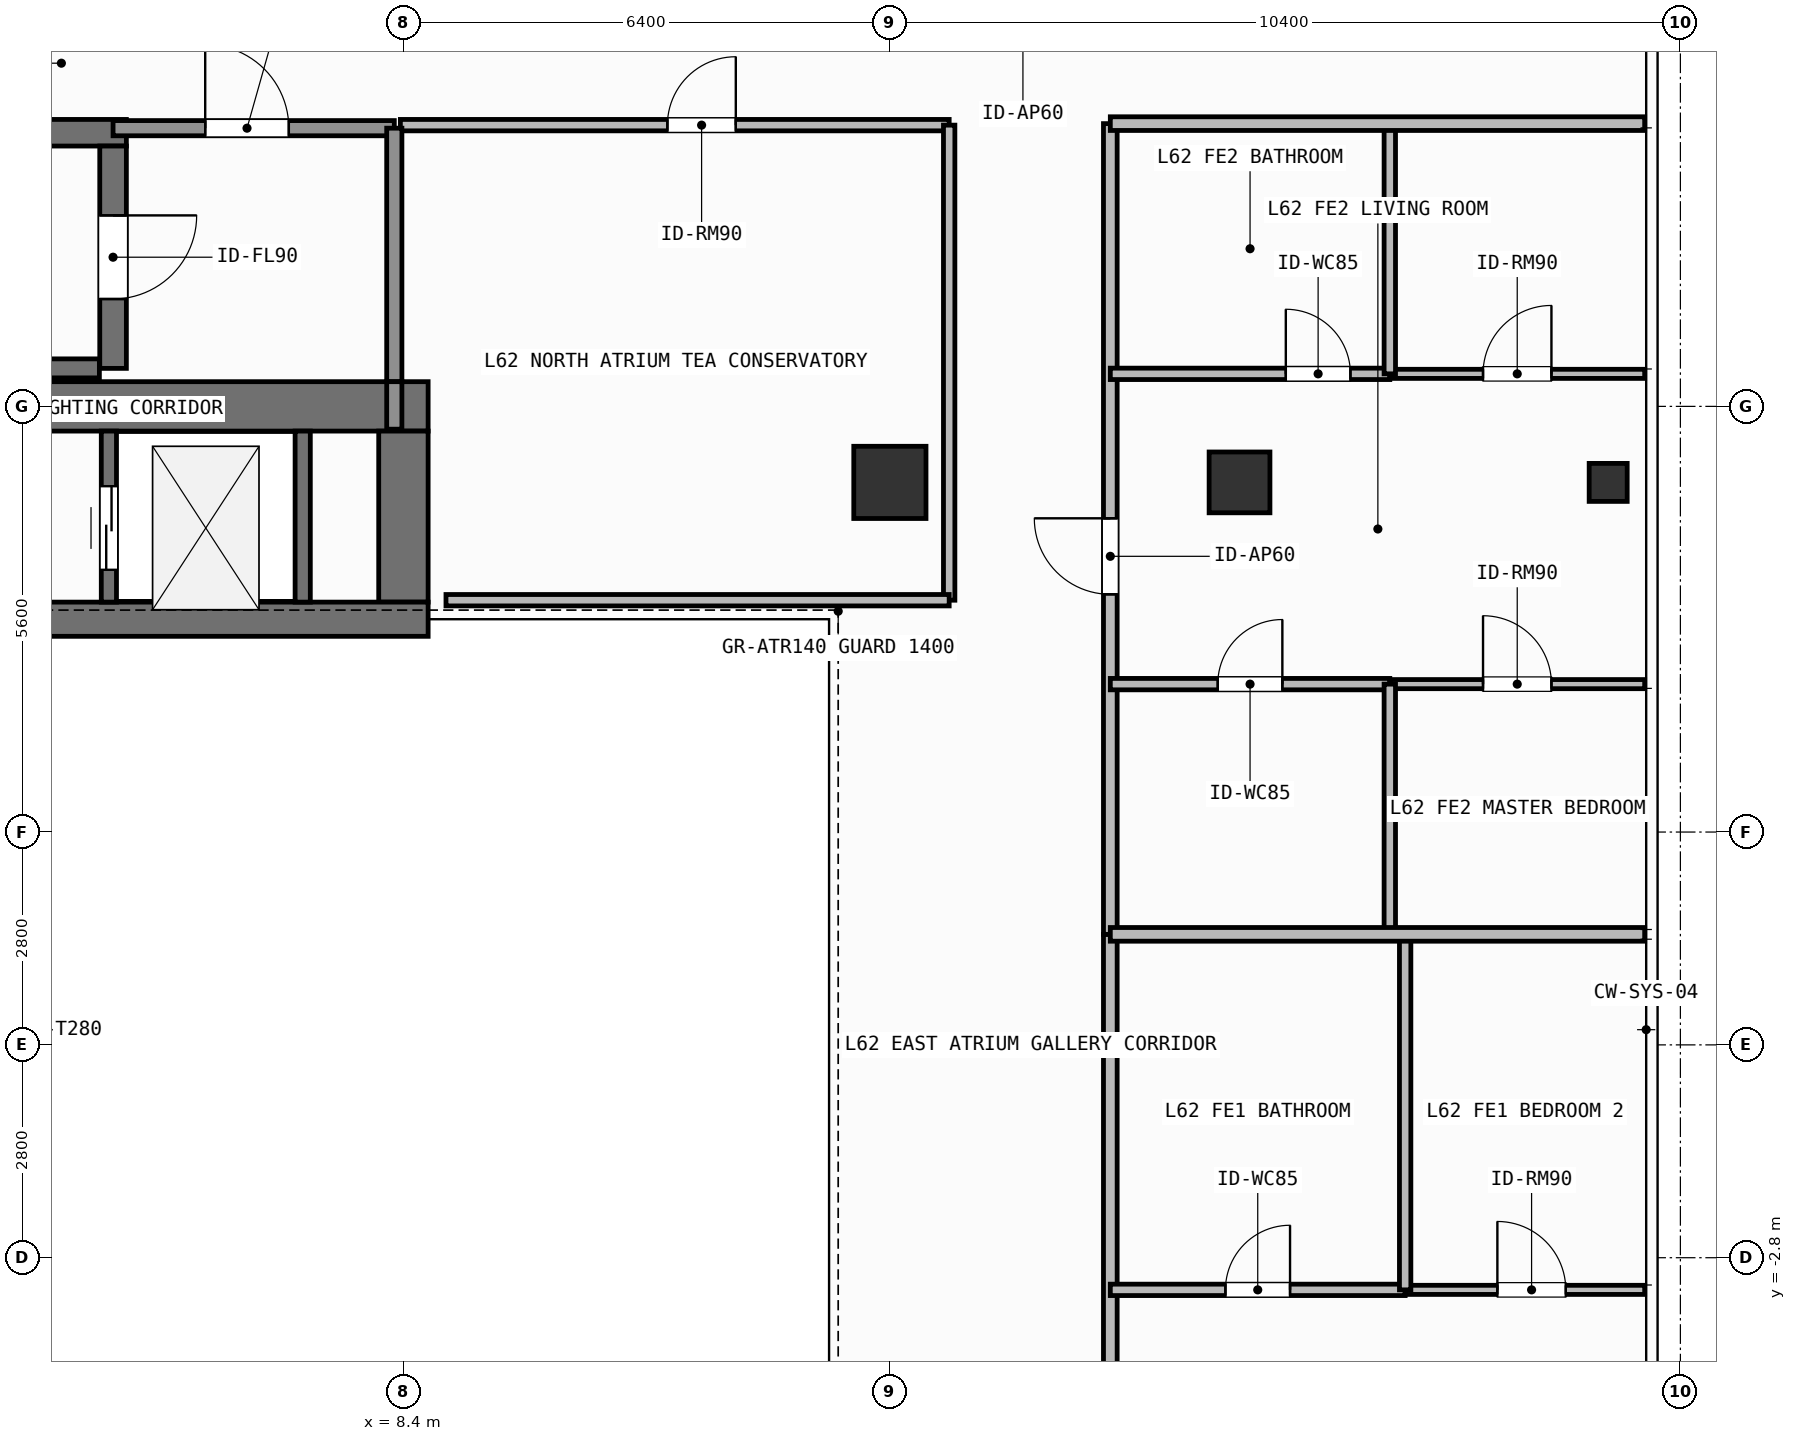
"""IFC4 building model, lengths in metres.
Left out: names, types, materials, properties, quantities, classifications, styles, units other than length and angle.
Written with IfcOpenShell. Run it as: python <this file> out.ifc"""

import sys

from ifc_helpers import new_model, si_unit, direction, frame, frame_2d, origin, origin_2d, place, context, subcontext, project, spatial, rectangle, hollow_rectangle, extrude, element, fill, save


model = new_model("IFC4")
c1 = context("Model", 3, precision=1e-05, world=origin(), true_north=direction((0.0, 1.0)))
c2 = subcontext(c1, "Body", "Model", "MODEL_VIEW")
j1 = project(units=[si_unit("LENGTHUNIT", "METRE"), si_unit("PLANEANGLEUNIT", "RADIAN")], contexts=[c1])
p1 = place(None, origin())
s1 = spatial("IfcSite", under=j1, at=p1, CompositionType="ELEMENT")
p2 = place(p1, origin())
s2 = spatial("IfcBuilding", under=s1, at=p2, CompositionType="ELEMENT")
p3 = place(p2, frame((0.0, 0.0, 254.7)))
s3 = spatial("IfcBuildingStorey", under=s2, at=p3, CompositionType="ELEMENT", Elevation=254.7)
p4 = place(p3, frame((-7.55, 8.4, 0.0), z_axis=(0.0, 0.0, 1.0), x_axis=(1.0, 0.0, 0.0)))
e1 = element("IfcWall", 1, at=p4, inside=s3, PredefinedType="SHEAR", context=c2, shape_type="SweptSolid", body=[
    extrude(rectangle(XDim=16.275, YDim=0.65, at=frame_2d((8.138, 0.0))), origin(), (0.0, 0.0, 1.0), 3.9),
])
p5 = place(p3, frame((8.4, 5.825, 0.0), z_axis=(0.0, 0.0, 1.0), x_axis=(0.0, 1.0, 0.0)))
e2 = element("IfcWall", 2, at=p5, inside=s3, PredefinedType="SHEAR", context=c2, shape_type="SweptSolid", body=[
    extrude(rectangle(XDim=2.25, YDim=0.65, at=frame_2d((1.125, 0.0))), origin(), (0.0, 0.0, 1.0), 3.9),
])
p6 = place(p3, frame((3.045, 5.6, 0.0), z_axis=(0.0, 0.0, 1.0), x_axis=(1.0, 0.0, 0.0)))
e3 = element("IfcWall", 3, at=p6, inside=s3, PredefinedType="SHEAR", context=c2, shape_type="SweptSolid", body=[
    extrude(rectangle(XDim=5.68, YDim=0.45, at=frame_2d((2.84, 0.0))), origin(), (0.0, 0.0, 1.0), 3.9),
])
p7 = place(p3, frame((-2.555, 12.0, 0.0), z_axis=(0.0, 0.0, 1.0), x_axis=(1.0, 0.0, 0.0)))
e4 = element("IfcWall", 4, at=p7, inside=s3, PredefinedType="SHEAR", context=c2, shape_type="SweptSolid", body=[
    extrude(rectangle(XDim=7.31, YDim=0.35, at=frame_2d((3.655, 0.0))), origin(), (0.0, 0.0, 1.0), 3.9),
])
p8 = place(p3, frame((-2.2, 8.9, 0.0), z_axis=(0.0, 0.0, 1.0), x_axis=(1.0, 0.0, 0.0)))
e5 = element("IfcWall", 5, at=p8, inside=s3, PredefinedType="SHEAR", context=c2, shape_type="SweptSolid", body=[
    extrude(rectangle(XDim=6.6, YDim=0.25, at=frame_2d((3.3, 0.0))), origin(), (0.0, 0.0, 1.0), 3.9),
])
p9 = place(p3, frame((4.58, 11.825, 0.0), z_axis=(0.0, 0.0, 1.0), x_axis=(0.0, -1.0, 0.0)))
e6 = element("IfcWall", 6, at=p9, inside=s3, PredefinedType="SHEAR", context=c2, shape_type="SweptSolid", body=[
    extrude(rectangle(XDim=2.925, YDim=0.35, at=frame_2d((1.462, 0.0))), origin(), (0.0, 0.0, 1.0), 3.9),
])
p10 = place(p9, frame((0.913, 0.0, 0.0)))
e7 = element("IfcOpeningElement", 7, at=p10, cuts=e6, PredefinedType="OPENING", context=c2, shape_type="SweptSolid", body=[
    extrude(rectangle(XDim=1.1, YDim=2.15, at=frame_2d((0.55, 1.075))), frame((0.0, 0.185, 0.0), z_axis=(0.0, -1.0, 0.0), x_axis=(1.0, 0.0, 0.0)), (0.0, 0.0, 1.0), 0.37),
])
p11 = place(p3, frame((14.8, 7.4, 0.0), z_axis=(0.0, 0.0, 1.0), x_axis=(1.0, 0.0, 0.0)))
e8 = element("IfcColumn", 8, at=p11, inside=s3, PredefinedType="COLUMN", context=c2, shape_type="SweptSolid", body=[
    extrude(rectangle(XDim=0.95, YDim=0.95, at=origin_2d()), origin(), (0.0, 0.0, 1.0), 3.9),
])
p12 = place(p3, frame((19.4, 7.4, 0.0), z_axis=(0.0, 0.0, 1.0), x_axis=(1.0, 0.0, 0.0)))
e9 = element("IfcColumn", 9, at=p12, inside=s3, PredefinedType="COLUMN", context=c2, shape_type="SweptSolid", body=[
    extrude(hollow_rectangle(XDim=0.8, YDim=0.8, WallThickness=0.036, at=origin_2d()), origin(), (0.0, 0.0, 1.0), 3.9),
])
p13 = place(p3, frame((24.25, 7.4, 0.0), z_axis=(0.0, 0.0, 1.0), x_axis=(1.0, 0.0, 0.0)))
e10 = element("IfcColumn", 10, at=p13, inside=s3, PredefinedType="COLUMN", context=c2, shape_type="SweptSolid", body=[
    extrude(hollow_rectangle(XDim=0.5, YDim=0.5, WallThickness=0.025, at=origin_2d()), origin(), (0.0, 0.0, 1.0), 3.9),
])
p14 = place(p3, frame((4.525, 5.825, 0.0), z_axis=(0.0, 0.0, 1.0), x_axis=(0.0, 1.0, 0.0)))
e11 = element("IfcWall", 11, at=p14, inside=s3, PredefinedType="SHEAR", context=c2, shape_type="SweptSolid", body=[
    extrude(rectangle(XDim=2.25, YDim=0.2, at=frame_2d((1.125, 0.0))), origin(), (0.0, 0.0, 1.0), 3.68),
])
p15 = place(p14, frame((0.425, 0.0, 0.0)))
e12 = element("IfcOpeningElement", 12, at=p15, cuts=e11, PredefinedType="OPENING", context=c2, shape_type="SweptSolid", body=[
    extrude(rectangle(XDim=1.1, YDim=2.2, at=frame_2d((0.55, 1.1))), frame((0.0, 0.11, 0.0), z_axis=(0.0, -1.0, 0.0), x_axis=(1.0, 0.0, 0.0)), (0.0, 0.0, 1.0), 0.22),
])
p16 = place(p3, frame((7.075, 5.825, 0.0), z_axis=(0.0, 0.0, 1.0), x_axis=(0.0, 1.0, 0.0)))
e13 = element("IfcWall", 13, at=p16, inside=s3, PredefinedType="SHEAR", context=c2, shape_type="SweptSolid", body=[
    extrude(rectangle(XDim=2.25, YDim=0.2, at=frame_2d((1.125, 0.0))), origin(), (0.0, 0.0, 1.0), 3.68),
])
p17 = place(p3, frame((4.58, 12.06, 0.0), z_axis=(0.0, 0.0, 1.0), x_axis=(1.0, 0.0, 0.0)))
e14 = element("IfcWall", 14, at=p17, inside=s3, PredefinedType="SOLIDWALL", context=c2, shape_type="SweptSolid", body=[
    extrude(rectangle(XDim=3.7, YDim=0.2, at=frame_2d((1.85, 0.0))), origin(), (0.0, 0.0, 1.0), 3.68),
])
p18 = place(p17, frame((1.212, 0.0, 0.0)))
e15 = element("IfcOpeningElement", 15, at=p18, cuts=e14, PredefinedType="OPENING", context=c2, shape_type="SweptSolid", body=[
    extrude(rectangle(XDim=1.1, YDim=2.15, at=frame_2d((0.55, 1.075))), frame((0.0, 0.11, 0.0), z_axis=(0.0, -1.0, 0.0), x_axis=(1.0, 0.0, 0.0)), (0.0, 0.0, 1.0), 0.22),
])
p19 = place(p3, frame((8.36, 12.1, 0.0), z_axis=(0.0, 0.0, 1.0), x_axis=(1.0, 0.0, 0.0)))
e16 = element("IfcWall", 16, at=p19, inside=s3, PredefinedType="PARTITIONING", context=c2, shape_type="SweptSolid", body=[
    extrude(rectangle(XDim=7.22, YDim=0.15, at=frame_2d((3.61, 0.0))), origin(), (0.0, 0.0, 1.0), 3.68),
])
p20 = place(p19, frame((3.513, 0.0, 0.0)))
e17 = element("IfcOpeningElement", 17, at=p20, cuts=e16, PredefinedType="OPENING", context=c2, shape_type="SweptSolid", body=[
    extrude(rectangle(XDim=0.9, YDim=2.1, at=frame_2d((0.45, 1.05))), frame((0.0, 0.085, 0.0), z_axis=(0.0, -1.0, 0.0), x_axis=(1.0, 0.0, 0.0)), (0.0, 0.0, 1.0), 0.17),
])
p21 = place(p3, frame((17.7, -12.12, 0.0), z_axis=(0.0, 0.0, 1.0), x_axis=(0.0, 1.0, 0.0)))
e18 = element("IfcWall", 18, at=p21, inside=s3, PredefinedType="PARTITIONING", context=c2, shape_type="SweptSolid", body=[
    extrude(rectangle(XDim=13.574, YDim=0.18, at=frame_2d((6.787, 0.0))), origin(), (0.0, 0.0, 1.0), 3.68),
])
p22 = place(p21, frame((5.665, 0.0, 0.0)))
e19 = element("IfcOpeningElement", 19, at=p22, cuts=e18, PredefinedType="OPENING", context=c2, shape_type="SweptSolid", body=[
    extrude(rectangle(XDim=1.0, YDim=2.2, at=frame_2d((0.5, 1.1))), frame((0.0, 0.1, 0.0), z_axis=(0.0, -1.0, 0.0), x_axis=(1.0, 0.0, 0.0)), (0.0, 0.0, 1.0), 0.2),
])
p23 = place(p3, frame((17.7, -3.223, 0.0), z_axis=(0.0, 0.0, 1.0), x_axis=(1.0, 0.0, 0.0)))
e20 = element("IfcWall", 20, at=p23, inside=s3, PredefinedType="PARTITIONING", context=c2, shape_type="SweptSolid", body=[
    extrude(rectangle(XDim=3.879, YDim=0.15, at=frame_2d((1.939, 0.0))), origin(), (0.0, 0.0, 1.0), 3.68),
])
p24 = place(p23, frame((1.514, 0.0, 0.0)))
e21 = element("IfcOpeningElement", 21, at=p24, cuts=e20, PredefinedType="OPENING", context=c2, shape_type="SweptSolid", body=[
    extrude(rectangle(XDim=0.85, YDim=2.1, at=frame_2d((0.425, 1.05))), frame((0.0, 0.085, 0.0), z_axis=(0.0, -1.0, 0.0), x_axis=(1.0, 0.0, 0.0)), (0.0, 0.0, 1.0), 0.17),
])
p25 = place(p3, frame((21.579, -3.223, 0.0), z_axis=(0.0, 0.0, 1.0), x_axis=(1.0, 0.0, 0.0)))
e22 = element("IfcWall", 22, at=p25, inside=s3, PredefinedType="PARTITIONING", context=c2, shape_type="SweptSolid", body=[
    extrude(rectangle(XDim=3.151, YDim=0.12, at=frame_2d((1.575, 0.0))), origin(), (0.0, 0.0, 1.0), 3.68),
])
p26 = place(p25, frame((1.213, 0.0, 0.0)))
e23 = element("IfcOpeningElement", 23, at=p26, cuts=e22, PredefinedType="OPENING", context=c2, shape_type="SweptSolid", body=[
    extrude(rectangle(XDim=0.9, YDim=2.1, at=frame_2d((0.45, 1.05))), frame((0.0, 0.07, 0.0), z_axis=(0.0, -1.0, 0.0), x_axis=(1.0, 0.0, 0.0)), (0.0, 0.0, 1.0), 0.14),
])
p27 = place(p3, frame((17.7, 1.454, 0.0), z_axis=(0.0, 0.0, 1.0), x_axis=(0.0, 1.0, 0.0)))
e24 = element("IfcWall", 24, at=p27, inside=s3, PredefinedType="PARTITIONING", context=c2, shape_type="SweptSolid", body=[
    extrude(rectangle(XDim=10.666, YDim=0.18, at=frame_2d((5.333, 0.0))), origin(), (0.0, 0.0, 1.0), 3.68),
])
p28 = place(p27, frame((4.473, 0.0, 0.0)))
e25 = element("IfcOpeningElement", 25, at=p28, cuts=e24, PredefinedType="OPENING", context=c2, shape_type="SweptSolid", body=[
    extrude(rectangle(XDim=1.0, YDim=2.2, at=frame_2d((0.5, 1.1))), frame((0.0, 0.1, 0.0), z_axis=(0.0, -1.0, 0.0), x_axis=(1.0, 0.0, 0.0)), (0.0, 0.0, 1.0), 0.2),
])
p29 = place(p3, frame((17.7, 8.828, 0.0), z_axis=(0.0, 0.0, 1.0), x_axis=(1.0, 0.0, 0.0)))
e26 = element("IfcWall", 26, at=p29, inside=s3, PredefinedType="PARTITIONING", context=c2, shape_type="SweptSolid", body=[
    extrude(rectangle(XDim=3.677, YDim=0.15, at=frame_2d((1.838, 0.0))), origin(), (0.0, 0.0, 1.0), 3.68),
])
p30 = place(p29, frame((2.309, 0.0, 0.0)))
e27 = element("IfcOpeningElement", 27, at=p30, cuts=e26, PredefinedType="OPENING", context=c2, shape_type="SweptSolid", body=[
    extrude(rectangle(XDim=0.85, YDim=2.1, at=frame_2d((0.425, 1.05))), frame((0.0, 0.085, 0.0), z_axis=(0.0, -1.0, 0.0), x_axis=(1.0, 0.0, 0.0)), (0.0, 0.0, 1.0), 0.17),
])
p31 = place(p3, frame((17.7, 4.746, 0.0), z_axis=(0.0, 0.0, 1.0), x_axis=(1.0, 0.0, 0.0)))
e28 = element("IfcWall", 28, at=p31, inside=s3, PredefinedType="PARTITIONING", context=c2, shape_type="SweptSolid", body=[
    extrude(rectangle(XDim=3.677, YDim=0.15, at=frame_2d((1.838, 0.0))), origin(), (0.0, 0.0, 1.0), 3.68),
])
p32 = place(p31, frame((1.414, 0.0, 0.0)))
e29 = element("IfcOpeningElement", 29, at=p32, cuts=e28, PredefinedType="OPENING", context=c2, shape_type="SweptSolid", body=[
    extrude(rectangle(XDim=0.85, YDim=2.1, at=frame_2d((0.425, 1.05))), frame((0.0, 0.085, 0.0), z_axis=(0.0, -1.0, 0.0), x_axis=(1.0, 0.0, 0.0)), (0.0, 0.0, 1.0), 0.17),
])
p33 = place(p3, frame((21.377, 4.746, 0.0), z_axis=(0.0, 0.0, 1.0), x_axis=(1.0, 0.0, 0.0)))
e30 = element("IfcWall", 30, at=p33, inside=s3, PredefinedType="PARTITIONING", context=c2, shape_type="SweptSolid", body=[
    extrude(rectangle(XDim=3.353, YDim=0.12, at=frame_2d((1.677, 0.0))), origin(), (0.0, 0.0, 1.0), 3.68),
])
p34 = place(p33, frame((1.227, 0.0, 0.0)))
e31 = element("IfcOpeningElement", 31, at=p34, cuts=e30, PredefinedType="OPENING", context=c2, shape_type="SweptSolid", body=[
    extrude(rectangle(XDim=0.9, YDim=2.1, at=frame_2d((0.45, 1.05))), frame((0.0, 0.07, 0.0), z_axis=(0.0, -1.0, 0.0), x_axis=(1.0, 0.0, 0.0)), (0.0, 0.0, 1.0), 0.14),
])
p35 = place(p3, frame((21.377, 8.828, 0.0), z_axis=(0.0, 0.0, 1.0), x_axis=(1.0, 0.0, 0.0)))
e32 = element("IfcWall", 32, at=p35, inside=s3, PredefinedType="PARTITIONING", context=c2, shape_type="SweptSolid", body=[
    extrude(rectangle(XDim=3.353, YDim=0.12, at=frame_2d((1.677, 0.0))), origin(), (0.0, 0.0, 1.0), 3.68),
])
p36 = place(p35, frame((1.227, 0.0, 0.0)))
e33 = element("IfcOpeningElement", 33, at=p36, cuts=e32, PredefinedType="OPENING", context=c2, shape_type="SweptSolid", body=[
    extrude(rectangle(XDim=0.9, YDim=2.1, at=frame_2d((0.45, 1.05))), frame((0.0, 0.07, 0.0), z_axis=(0.0, -1.0, 0.0), x_axis=(1.0, 0.0, 0.0)), (0.0, 0.0, 1.0), 0.14),
])
p37 = place(p3, frame((8.28, 8.725, 0.0), z_axis=(0.0, 0.0, 1.0), x_axis=(0.0, 1.0, 0.0)))
e34 = element("IfcWall", 34, at=p37, inside=s3, PredefinedType="SOLIDWALL", context=c2, shape_type="SweptSolid", body=[
    extrude(rectangle(XDim=3.335, YDim=0.2, at=frame_2d((1.667, 0.0))), origin(), (0.0, 0.0, 1.0), 3.68),
])
p38 = place(p3, frame((8.28, 8.1, 0.0), z_axis=(0.0, 0.0, 1.0), x_axis=(0.0, 1.0, 0.0)))
e35 = element("IfcWall", 35, at=p38, inside=s3, PredefinedType="SOLIDWALL", context=c2, shape_type="SweptSolid", body=[
    extrude(rectangle(XDim=0.625, YDim=0.2, at=frame_2d((0.312, 0.0))), origin(), (0.0, 0.0, 1.0), 3.68),
])
p39 = place(p3, frame((15.58, 5.85, 0.0), z_axis=(0.0, 0.0, 1.0), x_axis=(0.0, 1.0, 0.0)))
e36 = element("IfcWall", 36, at=p39, inside=s3, PredefinedType="PARTITIONING", context=c2, shape_type="SweptSolid", body=[
    extrude(rectangle(XDim=6.25, YDim=0.15, at=frame_2d((3.125, 0.0))), origin(), (0.0, 0.0, 1.0), 3.68),
])
p40 = place(p3, frame((8.96, 5.85, 0.0), z_axis=(0.0, 0.0, 1.0), x_axis=(1.0, 0.0, 0.0)))
e37 = element("IfcWall", 37, at=p40, inside=s3, PredefinedType="PARTITIONING", context=c2, shape_type="SweptSolid", body=[
    extrude(rectangle(XDim=6.62, YDim=0.15, at=frame_2d((3.31, 0.0))), origin(), (0.0, 0.0, 1.0), 3.68),
])
p41 = place(p3, frame((21.579, -3.223, 0.0), z_axis=(0.0, 0.0, 1.0), x_axis=(0.0, 1.0, 0.0)))
e38 = element("IfcWall", 38, at=p41, inside=s3, PredefinedType="PARTITIONING", context=c2, shape_type="SweptSolid", body=[
    extrude(rectangle(XDim=4.677, YDim=0.15, at=frame_2d((2.338, 0.0))), origin(), (0.0, 0.0, 1.0), 3.68),
])
p42 = place(p3, frame((21.377, 1.454, 0.0), z_axis=(0.0, 0.0, 1.0), x_axis=(0.0, 1.0, 0.0)))
e39 = element("IfcWall", 39, at=p42, inside=s3, PredefinedType="PARTITIONING", context=c2, shape_type="SweptSolid", body=[
    extrude(rectangle(XDim=3.292, YDim=0.15, at=frame_2d((1.646, 0.0))), origin(), (0.0, 0.0, 1.0), 3.68),
])
p43 = place(p3, frame((21.377, 8.828, 0.0), z_axis=(0.0, 0.0, 1.0), x_axis=(0.0, 1.0, 0.0)))
e40 = element("IfcWall", 40, at=p43, inside=s3, PredefinedType="PARTITIONING", context=c2, shape_type="SweptSolid", body=[
    extrude(rectangle(XDim=3.292, YDim=0.15, at=frame_2d((1.646, 0.0))), origin(), (0.0, 0.0, 1.0), 3.68),
])
for number, where, z_axis, x_axis in (
    (41, (17.7, 1.454, 0.0), (0.0, 0.0, 1.0), (1.0, 0.0, 0.0)),
    (42, (17.7, 12.12, 0.0), (0.0, 0.0, 1.0), (1.0, 0.0, 0.0)),
):
    element("IfcWall", number, at=place(p3, frame(where, z_axis=z_axis, x_axis=x_axis)), inside=s3, PredefinedType="PARTITIONING", context=c2, shape_type="SweptSolid", body=[
        extrude(rectangle(XDim=7.03, YDim=0.18, at=frame_2d((3.515, 0.0))), origin(), (0.0, 0.0, 1.0), 3.68),
    ])
p44 = place(p15, origin())
e43 = element("IfcDoor", 43, at=p44, inside=s3, OperationType="SLIDING_TO_LEFT", PredefinedType="DOOR", context=c2, shape_type="SweptSolid", body=[
    extrude(rectangle(XDim=1.1, YDim=2.2, at=frame_2d((0.55, 1.1))), frame((0.0, 0.025, 0.0), z_axis=(0.0, -1.0, 0.0), x_axis=(1.0, 0.0, 0.0)), (0.0, 0.0, 1.0), 0.05),
])
fill(e12, e43)
p45 = place(p10, origin())
e44 = element("IfcDoor", 44, at=p45, inside=s3, OperationType="SINGLE_SWING_LEFT", PredefinedType="DOOR", context=c2, shape_type="SweptSolid", body=[
    extrude(rectangle(XDim=1.1, YDim=2.15, at=frame_2d((0.55, 1.075))), frame((0.0, 0.025, 0.0), z_axis=(0.0, -1.0, 0.0), x_axis=(1.0, 0.0, 0.0)), (0.0, 0.0, 1.0), 0.05),
])
fill(e7, e44)
p46 = place(p18, origin())
e45 = element("IfcDoor", 45, at=p46, inside=s3, OperationType="SINGLE_SWING_LEFT", PredefinedType="DOOR", context=c2, shape_type="SweptSolid", body=[
    extrude(rectangle(XDim=1.1, YDim=2.15, at=frame_2d((0.55, 1.075))), frame((0.0, 0.025, 0.0), z_axis=(0.0, -1.0, 0.0), x_axis=(1.0, 0.0, 0.0)), (0.0, 0.0, 1.0), 0.05),
])
fill(e15, e45)
p47 = place(p20, origin())
e46 = element("IfcDoor", 46, at=p47, inside=s3, OperationType="SINGLE_SWING_RIGHT", PredefinedType="DOOR", context=c2, shape_type="SweptSolid", body=[
    extrude(rectangle(XDim=0.9, YDim=2.1, at=frame_2d((0.45, 1.05))), frame((0.0, 0.025, 0.0), z_axis=(0.0, -1.0, 0.0), x_axis=(1.0, 0.0, 0.0)), (0.0, 0.0, 1.0), 0.05),
])
fill(e17, e46)
p48 = place(p24, origin())
e47 = element("IfcDoor", 47, at=p48, inside=s3, OperationType="SINGLE_SWING_RIGHT", PredefinedType="DOOR", context=c2, shape_type="SweptSolid", body=[
    extrude(rectangle(XDim=0.85, YDim=2.1, at=frame_2d((0.425, 1.05))), frame((0.0, 0.025, 0.0), z_axis=(0.0, -1.0, 0.0), x_axis=(1.0, 0.0, 0.0)), (0.0, 0.0, 1.0), 0.05),
])
fill(e21, e47)
p49 = place(p26, origin())
e48 = element("IfcDoor", 48, at=p49, inside=s3, OperationType="SINGLE_SWING_LEFT", PredefinedType="DOOR", context=c2, shape_type="SweptSolid", body=[
    extrude(rectangle(XDim=0.9, YDim=2.1, at=frame_2d((0.45, 1.05))), frame((0.0, 0.025, 0.0), z_axis=(0.0, -1.0, 0.0), x_axis=(1.0, 0.0, 0.0)), (0.0, 0.0, 1.0), 0.05),
])
fill(e23, e48)
p50 = place(p28, origin())
e49 = element("IfcDoor", 49, at=p50, inside=s3, OperationType="SINGLE_SWING_RIGHT", PredefinedType="DOOR", context=c2, shape_type="SweptSolid", body=[
    extrude(rectangle(XDim=1.0, YDim=2.2, at=frame_2d((0.5, 1.1))), frame((0.0, 0.025, 0.0), z_axis=(0.0, -1.0, 0.0), x_axis=(1.0, 0.0, 0.0)), (0.0, 0.0, 1.0), 0.05),
])
fill(e25, e49)
p51 = place(p30, origin())
e50 = element("IfcDoor", 50, at=p51, inside=s3, OperationType="SINGLE_SWING_LEFT", PredefinedType="DOOR", context=c2, shape_type="SweptSolid", body=[
    extrude(rectangle(XDim=0.85, YDim=2.1, at=frame_2d((0.425, 1.05))), frame((0.0, 0.025, 0.0), z_axis=(0.0, -1.0, 0.0), x_axis=(1.0, 0.0, 0.0)), (0.0, 0.0, 1.0), 0.05),
])
fill(e27, e50)
p52 = place(p32, origin())
e51 = element("IfcDoor", 51, at=p52, inside=s3, OperationType="SINGLE_SWING_RIGHT", PredefinedType="DOOR", context=c2, shape_type="SweptSolid", body=[
    extrude(rectangle(XDim=0.85, YDim=2.1, at=frame_2d((0.425, 1.05))), frame((0.0, 0.025, 0.0), z_axis=(0.0, -1.0, 0.0), x_axis=(1.0, 0.0, 0.0)), (0.0, 0.0, 1.0), 0.05),
])
fill(e29, e51)
p53 = place(p34, origin())
e52 = element("IfcDoor", 52, at=p53, inside=s3, OperationType="SINGLE_SWING_LEFT", PredefinedType="DOOR", context=c2, shape_type="SweptSolid", body=[
    extrude(rectangle(XDim=0.9, YDim=2.1, at=frame_2d((0.45, 1.05))), frame((0.0, 0.025, 0.0), z_axis=(0.0, -1.0, 0.0), x_axis=(1.0, 0.0, 0.0)), (0.0, 0.0, 1.0), 0.05),
])
fill(e31, e52)
p54 = place(p36, origin())
e53 = element("IfcDoor", 53, at=p54, inside=s3, OperationType="SINGLE_SWING_RIGHT", PredefinedType="DOOR", context=c2, shape_type="SweptSolid", body=[
    extrude(rectangle(XDim=0.9, YDim=2.1, at=frame_2d((0.45, 1.05))), frame((0.0, 0.025, 0.0), z_axis=(0.0, -1.0, 0.0), x_axis=(1.0, 0.0, 0.0)), (0.0, 0.0, 1.0), 0.05),
])
fill(e33, e53)
save(model, sys.argv[1])
